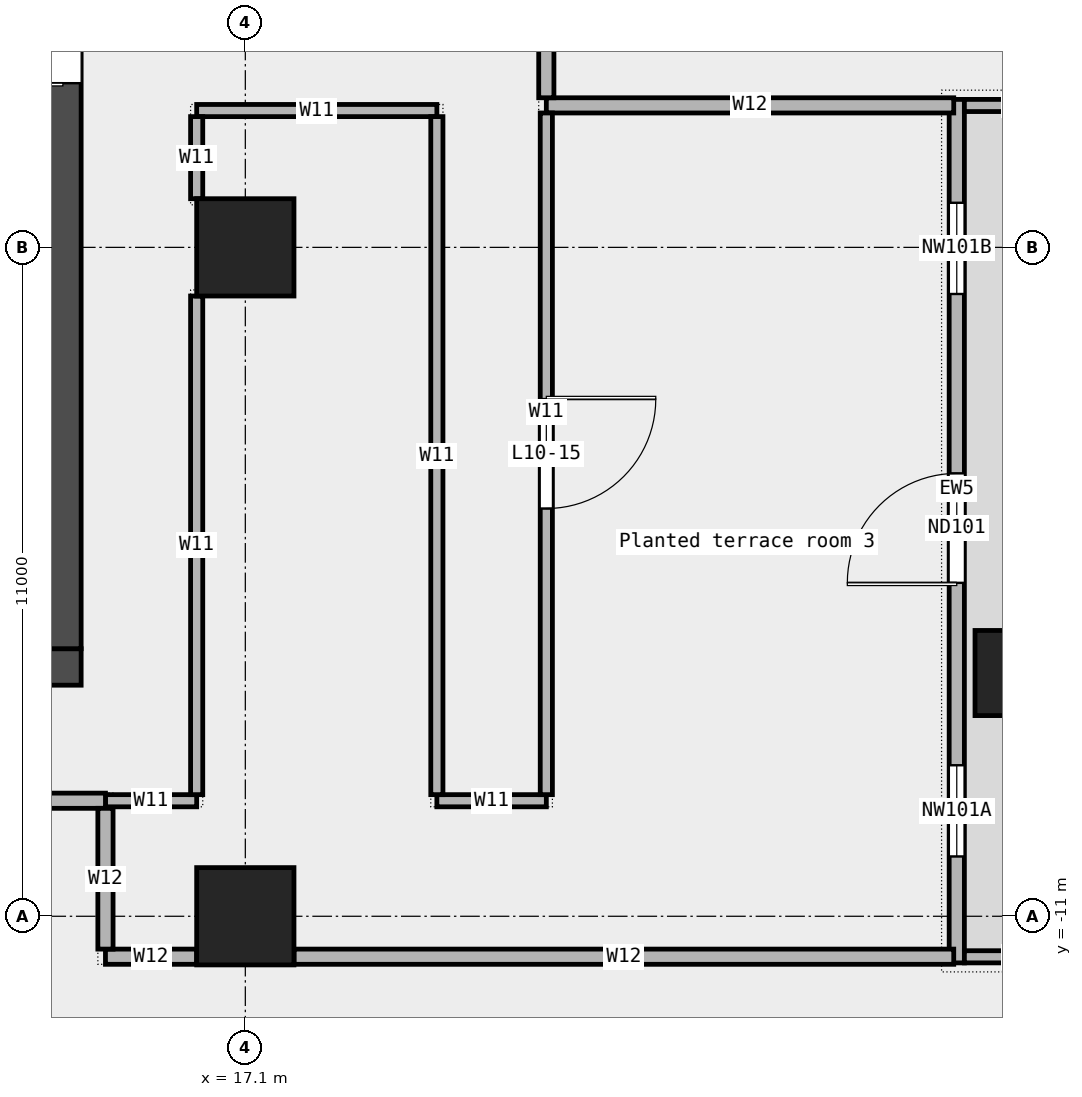
"""IFC4 building model, lengths in metres.
Left out: names, types, materials, properties, quantities, classifications, styles, units other than length and angle.
Written with IfcOpenShell. Run it as: python <this file> out.ifc"""

import sys

from ifc_helpers import new_model, si_unit, direction, frame, frame_2d, origin, origin_2d, place, context, subcontext, project, spatial, rectangle, extrude, element, fill, save


model = new_model("IFC4")
c1 = context("Model", 3, precision=1e-05, world=origin(), true_north=direction((0.0, 1.0)))
c2 = subcontext(c1, "Body", "Model", "MODEL_VIEW")
j1 = project(units=[si_unit("LENGTHUNIT", "METRE"), si_unit("PLANEANGLEUNIT", "RADIAN")], contexts=[c1])
p1 = place(None, origin())
s1 = spatial("IfcSite", under=j1, at=p1, CompositionType="ELEMENT")
p2 = place(p1, origin())
s2 = spatial("IfcBuilding", under=s1, at=p2, CompositionType="ELEMENT")
p3 = place(p2, frame((0.0, 0.0, 55.0)))
s3 = spatial("IfcBuildingStorey", under=s2, at=p3, CompositionType="ELEMENT", Elevation=55.0)
p4 = place(p3, frame((29.8, -7.0, 0.0), z_axis=(0.0, 0.0, 1.0), x_axis=(1.0, 0.0, 0.0)))
e1 = element("IfcColumn", 1, at=p4, inside=s3, PredefinedType="COLUMN", context=c2, shape_type="SweptSolid", body=[
    extrude(rectangle(XDim=1.4, YDim=1.4, at=origin_2d()), origin(), (0.0, 0.0, 1.0), 4.35),
])
for number, where, z_axis, x_axis in (
    (2, (17.1, -11.0, 0.0), (0.0, 0.0, 1.0), (1.0, 0.0, 0.0)),
    (3, (17.1, 0.0, 0.0), (0.0, 0.0, 1.0), (1.0, 0.0, 0.0)),
):
    element("IfcColumn", number, at=place(p3, frame(where, z_axis=z_axis, x_axis=x_axis)), inside=s3, PredefinedType="COLUMN", context=c2, shape_type="SweptSolid", body=[
        extrude(rectangle(XDim=1.6, YDim=1.6, at=origin_2d()), origin(), (0.0, 0.0, 1.0), 4.35),
    ])
p5 = place(p3, frame((28.8, -11.767, 0.0), z_axis=(0.0, 0.0, 1.0), x_axis=(0.0, 1.0, 0.0)))
e4 = element("IfcWall", 4, at=p5, inside=s3, PredefinedType="STANDARD", context=c2, shape_type="SweptSolid", body=[
    extrude(rectangle(XDim=14.2, YDim=0.25, at=frame_2d((7.1, 0.0))), origin(), (0.0, 0.0, 1.0), 4.35),
])
p6 = place(p5, frame((1.75, 0.0, 0.45)))
e5 = element("IfcOpeningElement", 5, at=p6, cuts=e4, PredefinedType="OPENING", context=c2, shape_type="SweptSolid", body=[
    extrude(rectangle(XDim=1.5, YDim=3.0, at=frame_2d((0.75, 1.5))), frame((0.0, 0.137, 0.0), z_axis=(0.0, -1.0, 0.0), x_axis=(1.0, 0.0, 0.0)), (0.0, 0.0, 1.0), 0.274),
])
p7 = place(p5, frame((6.25, 0.0, 0.0)))
e6 = element("IfcOpeningElement", 6, at=p7, cuts=e4, PredefinedType="OPENING", context=c2, shape_type="SweptSolid", body=[
    extrude(rectangle(XDim=1.8, YDim=2.4, at=frame_2d((0.9, 1.2))), frame((0.0, 0.137, 0.0), z_axis=(0.0, -1.0, 0.0), x_axis=(1.0, 0.0, 0.0)), (0.0, 0.0, 1.0), 0.274),
])
p8 = place(p5, frame((11.0, 0.0, 0.45)))
e7 = element("IfcOpeningElement", 7, at=p8, cuts=e4, PredefinedType="OPENING", context=c2, shape_type="SweptSolid", body=[
    extrude(rectangle(XDim=1.5, YDim=3.0, at=frame_2d((0.75, 1.5))), frame((0.0, 0.137, 0.0), z_axis=(0.0, -1.0, 0.0), x_axis=(1.0, 0.0, 0.0)), (0.0, 0.0, 1.0), 0.274),
])
for number, where, z_axis, x_axis in (
    (8, (30.8, -11.667, 0.0), (0.0, 0.0, 1.0), (-1.0, 0.0, 0.0)),
    (9, (30.8, 2.333, 0.0), (0.0, 0.0, 1.0), (-1.0, 0.0, 0.0)),
):
    element("IfcWall", number, at=place(p3, frame(where, z_axis=z_axis, x_axis=x_axis)), inside=s3, PredefinedType="STANDARD", context=c2, shape_type="SweptSolid", body=[
        extrude(rectangle(XDim=1.875, YDim=0.2, at=frame_2d((0.938, 0.0))), origin(), (0.0, 0.0, 1.0), 4.35),
    ])
p9 = place(p3, frame((14.8, -11.665, 0.0), z_axis=(0.0, 0.0, 1.0), x_axis=(1.0, 0.0, 0.0)))
e10 = element("IfcWall", 10, at=p9, inside=s3, PredefinedType="PARTITIONING", context=c2, shape_type="SweptSolid", body=[
    extrude(rectangle(XDim=1.5, YDim=0.25, at=frame_2d((0.75, 0.0))), origin(), (0.0, 0.0, 1.0), 4.35),
])
p10 = place(p3, frame((17.9, -11.665, 0.0), z_axis=(0.0, 0.0, 1.0), x_axis=(1.0, 0.0, 0.0)))
e11 = element("IfcWall", 11, at=p10, inside=s3, PredefinedType="PARTITIONING", context=c2, shape_type="SweptSolid", body=[
    extrude(rectangle(XDim=10.85, YDim=0.25, at=frame_2d((5.425, 0.0))), origin(), (0.0, 0.0, 1.0), 4.35),
])
p11 = place(p3, frame((14.8, -9.1, 0.0), z_axis=(0.0, 0.0, 1.0), x_axis=(1.0, 0.0, 0.0)))
e12 = element("IfcWall", 12, at=p11, inside=s3, PredefinedType="PARTITIONING", context=c2, shape_type="SweptSolid", body=[
    extrude(rectangle(XDim=1.5, YDim=0.2, at=frame_2d((0.75, 0.0))), origin(), (0.0, 0.0, 1.0), 4.35),
])
p12 = place(p3, frame((20.25, -9.1, 0.0), z_axis=(0.0, 0.0, 1.0), x_axis=(1.0, 0.0, 0.0)))
e13 = element("IfcWall", 13, at=p12, inside=s3, PredefinedType="PARTITIONING", context=c2, shape_type="SweptSolid", body=[
    extrude(rectangle(XDim=1.8, YDim=0.2, at=frame_2d((0.9, 0.0))), origin(), (0.0, 0.0, 1.0), 4.35),
])
p13 = place(p3, frame((-14.8, -9.1, 0.0), z_axis=(0.0, 0.0, 1.0), x_axis=(1.0, 0.0, 0.0)))
e14 = element("IfcWall", 14, at=p13, inside=s3, PredefinedType="PARTITIONING", context=c2, shape_type="SweptSolid", body=[
    extrude(rectangle(XDim=29.6, YDim=0.25, at=frame_2d((14.8, 0.0))), origin(), (0.0, 0.0, 1.0), 4.35),
])
p14 = place(p13, frame((4.802, 0.0, 0.0)))
e15 = element("IfcOpeningElement", 15, at=p14, cuts=e14, PredefinedType="OPENING", context=c2, shape_type="SweptSolid", body=[
    extrude(rectangle(XDim=1.8, YDim=2.1, at=frame_2d((0.9, 1.05))), frame((0.0, 0.137, 0.0), z_axis=(0.0, -1.0, 0.0), x_axis=(1.0, 0.0, 0.0)), (0.0, 0.0, 1.0), 0.274),
])
p15 = place(p13, frame((21.403, 0.0, 0.0)))
e16 = element("IfcOpeningElement", 16, at=p15, cuts=e14, PredefinedType="OPENING", context=c2, shape_type="SweptSolid", body=[
    extrude(rectangle(XDim=1.8, YDim=2.1, at=frame_2d((0.9, 1.05))), frame((0.0, 0.137, 0.0), z_axis=(0.0, -1.0, 0.0), x_axis=(1.0, 0.0, 0.0)), (0.0, 0.0, 1.0), 0.274),
])
p16 = place(p3, frame((16.3, 2.25, 0.0), z_axis=(0.0, 0.0, 1.0), x_axis=(1.0, 0.0, 0.0)))
e17 = element("IfcWall", 17, at=p16, inside=s3, PredefinedType="PARTITIONING", context=c2, shape_type="SweptSolid", body=[
    extrude(rectangle(XDim=3.95, YDim=0.2, at=frame_2d((1.975, 0.0))), origin(), (0.0, 0.0, 1.0), 4.35),
])
p17 = place(p3, frame((22.05, 2.335, 0.0), z_axis=(0.0, 0.0, 1.0), x_axis=(1.0, 0.0, 0.0)))
e18 = element("IfcWall", 18, at=p17, inside=s3, PredefinedType="PARTITIONING", context=c2, shape_type="SweptSolid", body=[
    extrude(rectangle(XDim=6.7, YDim=0.25, at=frame_2d((3.35, 0.0))), origin(), (0.0, 0.0, 1.0), 4.35),
])
p18 = place(p3, frame((14.8, -11.54, 0.0), z_axis=(0.0, 0.0, 1.0), x_axis=(0.0, 1.0, 0.0)))
e19 = element("IfcWall", 19, at=p18, inside=s3, PredefinedType="PARTITIONING", context=c2, shape_type="SweptSolid", body=[
    extrude(rectangle(XDim=2.315, YDim=0.25, at=frame_2d((1.157, 0.0))), origin(), (0.0, 0.0, 1.0), 4.35),
])
p19 = place(p3, frame((16.3, -9.0, 0.0), z_axis=(0.0, 0.0, 1.0), x_axis=(0.0, 1.0, 0.0)))
e20 = element("IfcWall", 20, at=p19, inside=s3, PredefinedType="PARTITIONING", context=c2, shape_type="SweptSolid", body=[
    extrude(rectangle(XDim=8.2, YDim=0.2, at=frame_2d((4.1, 0.0))), origin(), (0.0, 0.0, 1.0), 4.35),
])
p20 = place(p3, frame((16.3, 0.8, 0.0), z_axis=(0.0, 0.0, 1.0), x_axis=(0.0, 1.0, 0.0)))
e21 = element("IfcWall", 21, at=p20, inside=s3, PredefinedType="PARTITIONING", context=c2, shape_type="SweptSolid", body=[
    extrude(rectangle(XDim=1.35, YDim=0.2, at=frame_2d((0.675, 0.0))), origin(), (0.0, 0.0, 1.0), 4.35),
])
p21 = place(p3, frame((20.25, -9.0, 0.0), z_axis=(0.0, 0.0, 1.0), x_axis=(0.0, 1.0, 0.0)))
e22 = element("IfcWall", 22, at=p21, inside=s3, PredefinedType="PARTITIONING", context=c2, shape_type="SweptSolid", body=[
    extrude(rectangle(XDim=11.15, YDim=0.2, at=frame_2d((5.575, 0.0))), origin(), (0.0, 0.0, 1.0), 4.35),
])
p22 = place(p3, frame((22.05, -9.0, 0.0), z_axis=(0.0, 0.0, 1.0), x_axis=(0.0, 1.0, 0.0)))
e23 = element("IfcWall", 23, at=p22, inside=s3, PredefinedType="PARTITIONING", context=c2, shape_type="SweptSolid", body=[
    extrude(rectangle(XDim=11.21, YDim=0.2, at=frame_2d((5.605, 0.0))), origin(), (0.0, 0.0, 1.0), 4.35),
])
p23 = place(p22, frame((4.705, 0.0, 0.0)))
e24 = element("IfcOpeningElement", 24, at=p23, cuts=e23, PredefinedType="OPENING", context=c2, shape_type="SweptSolid", body=[
    extrude(rectangle(XDim=1.8, YDim=2.1, at=frame_2d((0.9, 1.05))), frame((0.0, 0.112, 0.0), z_axis=(0.0, -1.0, 0.0), x_axis=(1.0, 0.0, 0.0)), (0.0, 0.0, 1.0), 0.224),
])
p24 = place(p3, frame((22.05, 2.46, 0.0), z_axis=(0.0, 0.0, 1.0), x_axis=(0.0, 1.0, 0.0)))
e25 = element("IfcWall", 25, at=p24, inside=s3, PredefinedType="PARTITIONING", context=c2, shape_type="SweptSolid", body=[
    extrude(rectangle(XDim=12.79, YDim=0.25, at=frame_2d((6.395, 0.0))), origin(), (0.0, 0.0, 1.0), 4.35),
])
p25 = place(p24, frame((2.37, 0.0, 0.0)))
e26 = element("IfcOpeningElement", 26, at=p25, cuts=e25, PredefinedType="OPENING", context=c2, shape_type="SweptSolid", body=[
    extrude(rectangle(XDim=1.2, YDim=2.1, at=frame_2d((0.6, 1.05))), frame((0.0, 0.137, 0.0), z_axis=(0.0, -1.0, 0.0), x_axis=(1.0, 0.0, 0.0)), (0.0, 0.0, 1.0), 0.274),
])
p26 = place(p24, frame((8.765, 0.0, 0.0)))
e27 = element("IfcOpeningElement", 27, at=p26, cuts=e25, PredefinedType="OPENING", context=c2, shape_type="SweptSolid", body=[
    extrude(rectangle(XDim=1.2, YDim=2.1, at=frame_2d((0.6, 1.05))), frame((0.0, 0.137, 0.0), z_axis=(0.0, -1.0, 0.0), x_axis=(1.0, 0.0, 0.0)), (0.0, 0.0, 1.0), 0.274),
])
p27 = place(p3, frame((-14.4, -6.9, 0.0), z_axis=(0.0, 0.0, 1.0), x_axis=(1.0, 0.0, 0.0)))
e28 = element("IfcWall", 28, at=p27, inside=s3, PredefinedType="SHEAR", context=c2, shape_type="SweptSolid", body=[
    extrude(rectangle(XDim=28.8, YDim=0.6, at=frame_2d((14.4, 0.0))), origin(), (0.0, 0.0, 1.0), 4.5),
])
p28 = place(p27, frame((4.9, 0.0, 0.0)))
e29 = element("IfcOpeningElement", 29, at=p28, cuts=e28, PredefinedType="OPENING", context=c2, shape_type="SweptSolid", body=[
    extrude(rectangle(XDim=1.0, YDim=2.1, at=frame_2d((0.5, 1.05))), frame((0.0, 0.312, 0.0), z_axis=(0.0, -1.0, 0.0), x_axis=(1.0, 0.0, 0.0)), (0.0, 0.0, 1.0), 0.624),
])
p29 = place(p27, frame((8.462, 0.0, 0.0)))
e30 = element("IfcOpeningElement", 30, at=p29, cuts=e28, PredefinedType="OPENING", context=c2, shape_type="SweptSolid", body=[
    extrude(rectangle(XDim=1.0, YDim=2.1, at=frame_2d((0.5, 1.05))), frame((0.0, 0.312, 0.0), z_axis=(0.0, -1.0, 0.0), x_axis=(1.0, 0.0, 0.0)), (0.0, 0.0, 1.0), 0.624),
])
p30 = place(p27, frame((13.425, 0.0, 0.0)))
e31 = element("IfcOpeningElement", 31, at=p30, cuts=e28, PredefinedType="OPENING", context=c2, shape_type="SweptSolid", body=[
    extrude(rectangle(XDim=1.2, YDim=2.1, at=frame_2d((0.6, 1.05))), frame((0.0, 0.312, 0.0), z_axis=(0.0, -1.0, 0.0), x_axis=(1.0, 0.0, 0.0)), (0.0, 0.0, 1.0), 0.624),
])
p31 = place(p27, frame((18.75, 0.0, 0.0)))
e32 = element("IfcOpeningElement", 32, at=p31, cuts=e28, PredefinedType="OPENING", context=c2, shape_type="SweptSolid", body=[
    extrude(rectangle(XDim=1.8, YDim=2.1, at=frame_2d((0.9, 1.05))), frame((0.0, 0.312, 0.0), z_axis=(0.0, -1.0, 0.0), x_axis=(1.0, 0.0, 0.0)), (0.0, 0.0, 1.0), 0.624),
])
p32 = place(p27, frame((23.087, 0.0, 0.0)))
e33 = element("IfcOpeningElement", 33, at=p32, cuts=e28, PredefinedType="OPENING", context=c2, shape_type="SweptSolid", body=[
    extrude(rectangle(XDim=1.0, YDim=2.1, at=frame_2d((0.5, 1.05))), frame((0.0, 0.312, 0.0), z_axis=(0.0, -1.0, 0.0), x_axis=(1.0, 0.0, 0.0)), (0.0, 0.0, 1.0), 0.624),
])
p33 = place(p3, frame((14.1, -6.6, 0.0), z_axis=(0.0, 0.0, 1.0), x_axis=(0.0, 1.0, 0.0)))
e34 = element("IfcWall", 34, at=p33, inside=s3, PredefinedType="SHEAR", context=c2, shape_type="SweptSolid", body=[
    extrude(rectangle(XDim=19.5, YDim=0.6, at=frame_2d((9.75, 0.0))), origin(), (0.0, 0.0, 1.0), 4.5),
])
p34 = place(p33, frame((9.3, 0.0, 0.0)))
e35 = element("IfcOpeningElement", 35, at=p34, cuts=e34, PredefinedType="OPENING", context=c2, shape_type="SweptSolid", body=[
    extrude(rectangle(XDim=1.8, YDim=2.1, at=frame_2d((0.9, 1.05))), frame((0.0, 0.312, 0.0), z_axis=(0.0, -1.0, 0.0), x_axis=(1.0, 0.0, 0.0)), (0.0, 0.0, 1.0), 0.624),
])
p35 = place(p6, origin())
e36 = element("IfcWindow", 36, at=p35, inside=s3, PartitioningType="SINGLE_PANEL", PredefinedType="WINDOW", context=c2, shape_type="SweptSolid", body=[
    extrude(rectangle(XDim=1.5, YDim=3.0, at=frame_2d((0.75, 1.5))), frame((0.0, 0.03, 0.0), z_axis=(0.0, -1.0, 0.0), x_axis=(1.0, 0.0, 0.0)), (0.0, 0.0, 1.0), 0.06),
])
fill(e5, e36)
p36 = place(p7, origin())
e37 = element("IfcDoor", 37, at=p36, inside=s3, OperationType="DOUBLE_DOOR_SINGLE_SWING", PredefinedType="DOOR", context=c2, shape_type="SweptSolid", body=[
    extrude(rectangle(XDim=1.8, YDim=2.4, at=frame_2d((0.9, 1.2))), frame((0.0, 0.025, 0.0), z_axis=(0.0, -1.0, 0.0), x_axis=(1.0, 0.0, 0.0)), (0.0, 0.0, 1.0), 0.05),
])
fill(e6, e37)
p37 = place(p8, origin())
e38 = element("IfcWindow", 38, at=p37, inside=s3, PartitioningType="SINGLE_PANEL", PredefinedType="WINDOW", context=c2, shape_type="SweptSolid", body=[
    extrude(rectangle(XDim=1.5, YDim=3.0, at=frame_2d((0.75, 1.5))), frame((0.0, 0.03, 0.0), z_axis=(0.0, -1.0, 0.0), x_axis=(1.0, 0.0, 0.0)), (0.0, 0.0, 1.0), 0.06),
])
fill(e7, e38)
p38 = place(p23, origin())
e39 = element("IfcDoor", 39, at=p38, inside=s3, OperationType="DOUBLE_DOOR_SINGLE_SWING", PredefinedType="DOOR", context=c2, shape_type="SweptSolid", body=[
    extrude(rectangle(XDim=1.8, YDim=2.1, at=frame_2d((0.9, 1.05))), frame((0.0, 0.025, 0.0), z_axis=(0.0, -1.0, 0.0), x_axis=(1.0, 0.0, 0.0)), (0.0, 0.0, 1.0), 0.05),
])
fill(e24, e39)
p39 = place(p34, origin())
e40 = element("IfcDoor", 40, at=p39, inside=s3, OperationType="DOUBLE_DOOR_SINGLE_SWING", PredefinedType="DOOR", context=c2, shape_type="SweptSolid", body=[
    extrude(rectangle(XDim=1.8, YDim=2.1, at=frame_2d((0.9, 1.05))), frame((0.0, 0.025, 0.0), z_axis=(0.0, -1.0, 0.0), x_axis=(1.0, 0.0, 0.0)), (0.0, 0.0, 1.0), 0.05),
])
fill(e35, e40)
save(model, sys.argv[1])
